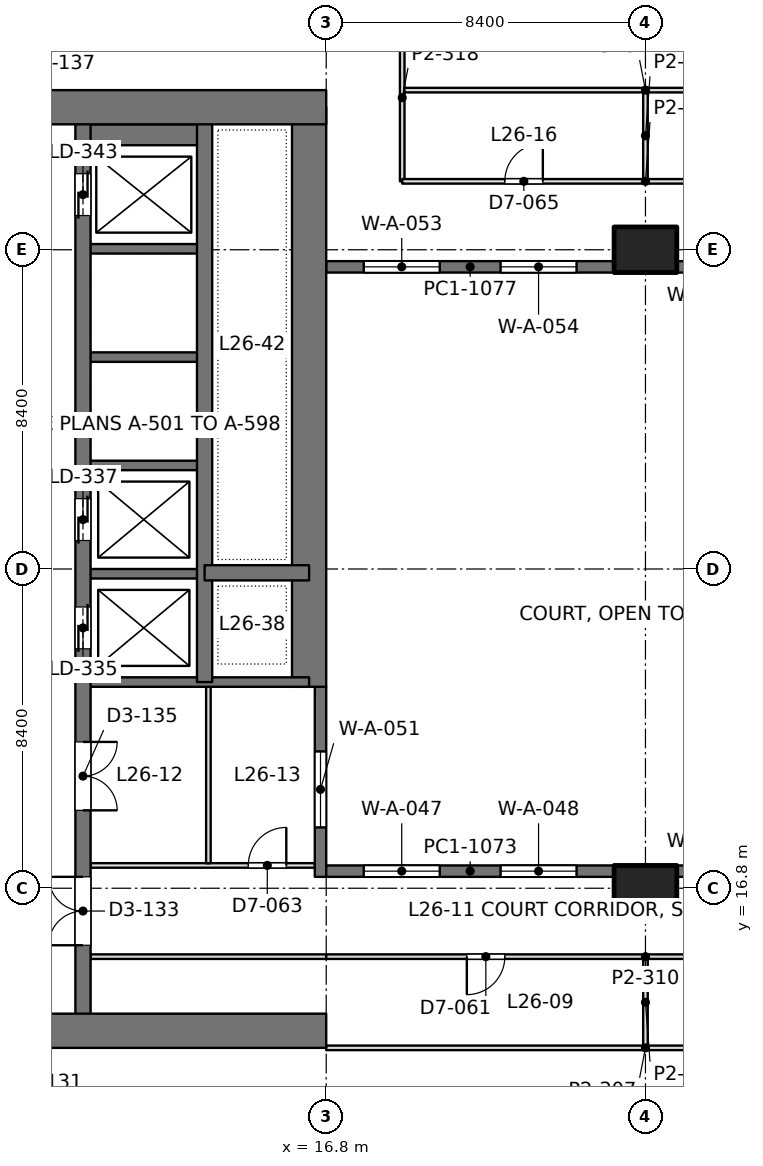
"""IFC4 building model, lengths in metres.
Left out: names, types, materials, properties, quantities, classifications, styles, units other than length and angle.
Written with IfcOpenShell. Run it as: python <this file> out.ifc"""

import sys

from ifc_helpers import new_model, si_unit, direction, frame, frame_2d, origin, origin_2d, place, context, subcontext, project, spatial, rectangle, extrude, element, fill, save


model = new_model("IFC4")
c1 = context("Model", 3, precision=1e-05, world=origin(), true_north=direction((0.0, 1.0)))
c2 = subcontext(c1, "Body", "Model", "MODEL_VIEW")
j1 = project(units=[si_unit("LENGTHUNIT", "METRE"), si_unit("PLANEANGLEUNIT", "RADIAN")], contexts=[c1])
p1 = place(None, origin())
s1 = spatial("IfcSite", under=j1, at=p1, CompositionType="ELEMENT")
p2 = place(p1, origin())
s2 = spatial("IfcBuilding", under=s1, at=p2, CompositionType="ELEMENT")
p3 = place(p2, frame((0.0, 0.0, 117.6)))
s3 = spatial("IfcBuildingStorey", under=s2, at=p3, CompositionType="ELEMENT", Elevation=117.6)
for number, where, z_axis, x_axis in (
    (1, (25.2, 16.8, 0.0), (0.0, 0.0, 1.0), (1.0, 0.0, 0.0)),
    (2, (25.2, 33.6, 0.0), (0.0, 0.0, 1.0), (1.0, 0.0, 0.0)),
):
    element("IfcColumn", number, at=place(p3, frame(where, z_axis=z_axis, x_axis=x_axis)), inside=s3, PredefinedType="COLUMN", context=c2, shape_type="SweptSolid", body=[
        extrude(rectangle(XDim=1.65, YDim=1.2, at=origin_2d()), origin(), (0.0, 0.0, 1.0), 4.2),
    ])
p4 = place(p3, frame((-1.2, 13.05, 0.0), z_axis=(0.0, 0.0, 1.0), x_axis=(1.0, 0.0, 0.0)))
e3 = element("IfcWall", 3, at=p4, inside=s3, PredefinedType="SHEAR", context=c2, shape_type="SweptSolid", body=[
    extrude(rectangle(XDim=18.0, YDim=0.9, at=frame_2d((9.0, 0.0))), origin(), (0.0, 0.0, 1.0), 4.2),
])
p5 = place(p4, frame((8.95, 0.0, 0.0)))
e4 = element("IfcOpeningElement", 4, at=p5, cuts=e3, PredefinedType="OPENING", context=c2, shape_type="SweptSolid", body=[
    extrude(rectangle(XDim=1.8, YDim=2.4, at=frame_2d((0.9, 1.2))), frame((0.0, 0.46, 0.0), z_axis=(0.0, -1.0, 0.0), x_axis=(1.0, 0.0, 0.0)), (0.0, 0.0, 1.0), 0.92),
])
p6 = place(p3, frame((-1.2, 37.35, 0.0), z_axis=(0.0, 0.0, 1.0), x_axis=(1.0, 0.0, 0.0)))
e5 = element("IfcWall", 5, at=p6, inside=s3, PredefinedType="SHEAR", context=c2, shape_type="SweptSolid", body=[
    extrude(rectangle(XDim=18.0, YDim=0.9, at=frame_2d((9.0, 0.0))), origin(), (0.0, 0.0, 1.0), 4.2),
])
p7 = place(p6, frame((8.95, 0.0, 0.0)))
e6 = element("IfcOpeningElement", 6, at=p7, cuts=e5, PredefinedType="OPENING", context=c2, shape_type="SweptSolid", body=[
    extrude(rectangle(XDim=1.8, YDim=2.4, at=frame_2d((0.9, 1.2))), frame((0.0, 0.46, 0.0), z_axis=(0.0, -1.0, 0.0), x_axis=(1.0, 0.0, 0.0)), (0.0, 0.0, 1.0), 0.92),
])
p8 = place(p3, frame((16.35, 22.1, 0.0), z_axis=(0.0, 0.0, 1.0), x_axis=(0.0, 1.0, 0.0)))
e7 = element("IfcWall", 7, at=p8, inside=s3, PredefinedType="SHEAR", context=c2, shape_type="SweptSolid", body=[
    extrude(rectangle(XDim=15.25, YDim=0.9, at=frame_2d((7.625, 0.0))), origin(), (0.0, 0.0, 1.0), 4.2),
])
p9 = place(p3, frame((10.4, 13.05, 0.0), z_axis=(0.0, 0.0, 1.0), x_axis=(0.0, 1.0, 0.0)))
e8 = element("IfcWall", 8, at=p9, inside=s3, PredefinedType="SHEAR", context=c2, shape_type="SweptSolid", body=[
    extrude(rectangle(XDim=24.3, YDim=0.4, at=frame_2d((12.15, 0.0))), origin(), (0.0, 0.0, 1.0), 4.2),
])
p10 = place(p9, frame((10.05, 0.0, 0.0)))
e9 = element("IfcOpeningElement", 9, at=p10, cuts=e8, PredefinedType="OPENING", context=c2, shape_type="SweptSolid", body=[
    extrude(rectangle(XDim=1.1, YDim=2.2, at=frame_2d((0.55, 1.1))), frame((0.0, 0.21, 0.0), z_axis=(0.0, -1.0, 0.0), x_axis=(1.0, 0.0, 0.0)), (0.0, 0.0, 1.0), 0.42),
])
p11 = place(p9, frame((12.9, 0.0, 0.0)))
e10 = element("IfcOpeningElement", 10, at=p11, cuts=e8, PredefinedType="OPENING", context=c2, shape_type="SweptSolid", body=[
    extrude(rectangle(XDim=1.1, YDim=2.2, at=frame_2d((0.55, 1.1))), frame((0.0, 0.21, 0.0), z_axis=(0.0, -1.0, 0.0), x_axis=(1.0, 0.0, 0.0)), (0.0, 0.0, 1.0), 0.42),
])
p12 = place(p9, frame((21.45, 0.0, 0.0)))
e11 = element("IfcOpeningElement", 11, at=p12, cuts=e8, PredefinedType="OPENING", context=c2, shape_type="SweptSolid", body=[
    extrude(rectangle(XDim=1.1, YDim=2.2, at=frame_2d((0.55, 1.1))), frame((0.0, 0.21, 0.0), z_axis=(0.0, -1.0, 0.0), x_axis=(1.0, 0.0, 0.0)), (0.0, 0.0, 1.0), 0.42),
])
p13 = place(p9, frame((2.25, 0.0, 0.0)))
e12 = element("IfcOpeningElement", 12, at=p13, cuts=e8, PredefinedType="OPENING", context=c2, shape_type="SweptSolid", body=[
    extrude(rectangle(XDim=1.8, YDim=2.4, at=frame_2d((0.9, 1.2))), frame((0.0, 0.21, 0.0), z_axis=(0.0, -1.0, 0.0), x_axis=(1.0, 0.0, 0.0)), (0.0, 0.0, 1.0), 0.42),
])
p14 = place(p9, frame((5.8, 0.0, 0.0)))
e13 = element("IfcOpeningElement", 13, at=p14, cuts=e8, PredefinedType="OPENING", context=c2, shape_type="SweptSolid", body=[
    extrude(rectangle(XDim=1.8, YDim=2.4, at=frame_2d((0.9, 1.2))), frame((0.0, 0.21, 0.0), z_axis=(0.0, -1.0, 0.0), x_axis=(1.0, 0.0, 0.0)), (0.0, 0.0, 1.0), 0.42),
])
p15 = place(p3, frame((13.6, 22.225, 0.0), z_axis=(0.0, 0.0, 1.0), x_axis=(0.0, 1.0, 0.0)))
e14 = element("IfcWall", 14, at=p15, inside=s3, PredefinedType="SHEAR", context=c2, shape_type="SweptSolid", body=[
    extrude(rectangle(XDim=15.125, YDim=0.4, at=frame_2d((7.562, 0.0))), origin(), (0.0, 0.0, 1.0), 4.2),
])
p16 = place(p3, frame((13.6, 25.1, 0.0), z_axis=(0.0, 0.0, 1.0), x_axis=(1.0, 0.0, 0.0)))
e15 = element("IfcWall", 15, at=p16, inside=s3, PredefinedType="SHEAR", context=c2, shape_type="SweptSolid", body=[
    extrude(rectangle(XDim=2.75, YDim=0.4, at=frame_2d((1.375, 0.0))), origin(), (0.0, 0.0, 1.0), 4.2),
])
p17 = place(p3, frame((10.4, 22.225, 0.0), z_axis=(0.0, 0.0, 1.0), x_axis=(1.0, 0.0, 0.0)))
e16 = element("IfcWall", 16, at=p17, inside=s3, PredefinedType="SHEAR", context=c2, shape_type="SweptSolid", body=[
    extrude(rectangle(XDim=5.95, YDim=0.25, at=frame_2d((2.975, 0.0))), origin(), (0.0, 0.0, 1.0), 4.2),
])
for number, where, z_axis, x_axis in (
    (17, (10.4, 25.075, 0.0), (0.0, 0.0, 1.0), (1.0, 0.0, 0.0)),
    (18, (10.4, 27.925, 0.0), (0.0, 0.0, 1.0), (1.0, 0.0, 0.0)),
    (19, (10.4, 30.775, 0.0), (0.0, 0.0, 1.0), (1.0, 0.0, 0.0)),
    (20, (10.4, 33.625, 0.0), (0.0, 0.0, 1.0), (1.0, 0.0, 0.0)),
):
    element("IfcWall", number, at=place(p3, frame(where, z_axis=z_axis, x_axis=x_axis)), inside=s3, PredefinedType="SHEAR", context=c2, shape_type="SweptSolid", body=[
        extrude(rectangle(XDim=3.2, YDim=0.25, at=frame_2d((1.6, 0.0))), origin(), (0.0, 0.0, 1.0), 4.2),
    ])
p18 = place(p3, frame((10.4, 36.625, 0.0), z_axis=(0.0, 0.0, 1.0), x_axis=(1.0, 0.0, 0.0)))
e21 = element("IfcWall", 21, at=p18, inside=s3, PredefinedType="SHEAR", context=c2, shape_type="SweptSolid", body=[
    extrude(rectangle(XDim=3.2, YDim=0.55, at=frame_2d((1.6, 0.0))), origin(), (0.0, 0.0, 1.0), 4.2),
])
p19 = place(p3, frame((16.65, 17.1, 0.0), z_axis=(0.0, 0.0, 1.0), x_axis=(0.0, 1.0, 0.0)))
e22 = element("IfcWall", 22, at=p19, inside=s3, PredefinedType="SOLIDWALL", context=c2, shape_type="SweptSolid", body=[
    extrude(rectangle(XDim=5.0, YDim=0.3, at=frame_2d((2.5, 0.0))), origin(), (0.0, 0.0, 1.0), 4.05),
])
p20 = place(p19, frame((1.3, 0.0, 0.1)))
e23 = element("IfcOpeningElement", 23, at=p20, cuts=e22, PredefinedType="OPENING", context=c2, shape_type="SweptSolid", body=[
    extrude(rectangle(XDim=2.0, YDim=3.0, at=frame_2d((1.0, 1.5))), frame((0.0, 0.16, 0.0), z_axis=(0.0, -1.0, 0.0), x_axis=(1.0, 0.0, 0.0)), (0.0, 0.0, 1.0), 0.32),
])
p21 = place(p3, frame((16.8, 17.25, 0.0), z_axis=(0.0, 0.0, 1.0), x_axis=(1.0, 0.0, 0.0)))
e24 = element("IfcWall", 24, at=p21, inside=s3, PredefinedType="SOLIDWALL", context=c2, shape_type="SweptSolid", body=[
    extrude(rectangle(XDim=7.575, YDim=0.3, at=frame_2d((3.788, 0.0))), origin(), (0.0, 0.0, 1.0), 4.05),
])
p22 = place(p21, frame((0.988, 0.0, 0.1)))
e25 = element("IfcOpeningElement", 25, at=p22, cuts=e24, PredefinedType="OPENING", context=c2, shape_type="SweptSolid", body=[
    extrude(rectangle(XDim=2.0, YDim=3.0, at=frame_2d((1.0, 1.5))), frame((0.0, 0.16, 0.0), z_axis=(0.0, -1.0, 0.0), x_axis=(1.0, 0.0, 0.0)), (0.0, 0.0, 1.0), 0.32),
])
p23 = place(p21, frame((4.587, 0.0, 0.1)))
e26 = element("IfcOpeningElement", 26, at=p23, cuts=e24, PredefinedType="OPENING", context=c2, shape_type="SweptSolid", body=[
    extrude(rectangle(XDim=2.0, YDim=3.0, at=frame_2d((1.0, 1.5))), frame((0.0, 0.16, 0.0), z_axis=(0.0, -1.0, 0.0), x_axis=(1.0, 0.0, 0.0)), (0.0, 0.0, 1.0), 0.32),
])
p24 = place(p3, frame((26.025, 17.25, 0.0), z_axis=(0.0, 0.0, 1.0), x_axis=(1.0, 0.0, 0.0)))
e27 = element("IfcWall", 27, at=p24, inside=s3, PredefinedType="SOLIDWALL", context=c2, shape_type="SweptSolid", body=[
    extrude(rectangle(XDim=7.575, YDim=0.3, at=frame_2d((3.788, 0.0))), origin(), (0.0, 0.0, 1.0), 4.05),
])
p25 = place(p24, frame((0.587, 0.0, 0.1)))
e28 = element("IfcOpeningElement", 28, at=p25, cuts=e27, PredefinedType="OPENING", context=c2, shape_type="SweptSolid", body=[
    extrude(rectangle(XDim=2.0, YDim=3.0, at=frame_2d((1.0, 1.5))), frame((0.0, 0.16, 0.0), z_axis=(0.0, -1.0, 0.0), x_axis=(1.0, 0.0, 0.0)), (0.0, 0.0, 1.0), 0.32),
])
p26 = place(p24, frame((4.188, 0.0, 0.1)))
e29 = element("IfcOpeningElement", 29, at=p26, cuts=e27, PredefinedType="OPENING", context=c2, shape_type="SweptSolid", body=[
    extrude(rectangle(XDim=2.0, YDim=3.0, at=frame_2d((1.0, 1.5))), frame((0.0, 0.16, 0.0), z_axis=(0.0, -1.0, 0.0), x_axis=(1.0, 0.0, 0.0)), (0.0, 0.0, 1.0), 0.32),
])
p27 = place(p3, frame((16.8, 33.15, 0.0), z_axis=(0.0, 0.0, 1.0), x_axis=(1.0, 0.0, 0.0)))
e30 = element("IfcWall", 30, at=p27, inside=s3, PredefinedType="SOLIDWALL", context=c2, shape_type="SweptSolid", body=[
    extrude(rectangle(XDim=7.575, YDim=0.3, at=frame_2d((3.788, 0.0))), origin(), (0.0, 0.0, 1.0), 4.05),
])
p28 = place(p27, frame((0.988, 0.0, 0.1)))
e31 = element("IfcOpeningElement", 31, at=p28, cuts=e30, PredefinedType="OPENING", context=c2, shape_type="SweptSolid", body=[
    extrude(rectangle(XDim=2.0, YDim=3.0, at=frame_2d((1.0, 1.5))), frame((0.0, 0.16, 0.0), z_axis=(0.0, -1.0, 0.0), x_axis=(1.0, 0.0, 0.0)), (0.0, 0.0, 1.0), 0.32),
])
p29 = place(p27, frame((4.587, 0.0, 0.1)))
e32 = element("IfcOpeningElement", 32, at=p29, cuts=e30, PredefinedType="OPENING", context=c2, shape_type="SweptSolid", body=[
    extrude(rectangle(XDim=2.0, YDim=3.0, at=frame_2d((1.0, 1.5))), frame((0.0, 0.16, 0.0), z_axis=(0.0, -1.0, 0.0), x_axis=(1.0, 0.0, 0.0)), (0.0, 0.0, 1.0), 0.32),
])
p30 = place(p3, frame((26.025, 33.15, 0.0), z_axis=(0.0, 0.0, 1.0), x_axis=(1.0, 0.0, 0.0)))
e33 = element("IfcWall", 33, at=p30, inside=s3, PredefinedType="SOLIDWALL", context=c2, shape_type="SweptSolid", body=[
    extrude(rectangle(XDim=7.575, YDim=0.3, at=frame_2d((3.788, 0.0))), origin(), (0.0, 0.0, 1.0), 4.05),
])
p31 = place(p30, frame((0.587, 0.0, 0.1)))
e34 = element("IfcOpeningElement", 34, at=p31, cuts=e33, PredefinedType="OPENING", context=c2, shape_type="SweptSolid", body=[
    extrude(rectangle(XDim=2.0, YDim=3.0, at=frame_2d((1.0, 1.5))), frame((0.0, 0.16, 0.0), z_axis=(0.0, -1.0, 0.0), x_axis=(1.0, 0.0, 0.0)), (0.0, 0.0, 1.0), 0.32),
])
p32 = place(p30, frame((4.188, 0.0, 0.1)))
e35 = element("IfcOpeningElement", 35, at=p32, cuts=e33, PredefinedType="OPENING", context=c2, shape_type="SweptSolid", body=[
    extrude(rectangle(XDim=2.0, YDim=3.0, at=frame_2d((1.0, 1.5))), frame((0.0, 0.16, 0.0), z_axis=(0.0, -1.0, 0.0), x_axis=(1.0, 0.0, 0.0)), (0.0, 0.0, 1.0), 0.32),
])
p33 = place(p3, frame((10.598, 17.4, 0.0), z_axis=(0.0, 0.0, 1.0), x_axis=(1.0, 0.0, 0.0)))
e36 = element("IfcWall", 36, at=p33, inside=s3, PredefinedType="PARTITIONING", context=c2, shape_type="SweptSolid", body=[
    extrude(rectangle(XDim=5.904, YDim=0.12, at=frame_2d((2.952, 0.0))), origin(), (0.0, 0.0, 1.0), 3.55),
])
p34 = place(p33, frame((4.152, 0.0, 0.0)))
e37 = element("IfcOpeningElement", 37, at=p34, cuts=e36, PredefinedType="OPENING", context=c2, shape_type="SweptSolid", body=[
    extrude(rectangle(XDim=1.0, YDim=2.4, at=frame_2d((0.5, 1.2))), frame((0.0, 0.07, 0.0), z_axis=(0.0, -1.0, 0.0), x_axis=(1.0, 0.0, 0.0)), (0.0, 0.0, 1.0), 0.14),
])
p35 = place(p3, frame((13.7, 17.458, 0.0), z_axis=(0.0, 0.0, 1.0), x_axis=(0.0, 1.0, 0.0)))
e38 = element("IfcWall", 38, at=p35, inside=s3, PredefinedType="PARTITIONING", context=c2, shape_type="SweptSolid", body=[
    extrude(rectangle(XDim=4.644, YDim=0.12, at=frame_2d((2.322, 0.0))), origin(), (0.0, 0.0, 1.0), 3.6),
])
p36 = place(p3, frame((10.598, 15.0, 0.0), z_axis=(0.0, 0.0, 1.0), x_axis=(1.0, 0.0, 0.0)))
e39 = element("IfcWall", 39, at=p36, inside=s3, PredefinedType="PARTITIONING", context=c2, shape_type="SweptSolid", body=[
    extrude(rectangle(XDim=6.204, YDim=0.12, at=frame_2d((3.102, 0.0))), origin(), (0.0, 0.0, 1.0), 3.55),
])
p37 = place(p3, frame((25.2, 12.658, 0.0), z_axis=(0.0, 0.0, 1.0), x_axis=(0.0, 1.0, 0.0)))
e40 = element("IfcWall", 40, at=p37, inside=s3, PredefinedType="PARTITIONING", context=c2, shape_type="SweptSolid", body=[
    extrude(rectangle(XDim=2.284, YDim=0.12, at=frame_2d((1.142, 0.0))), origin(), (0.0, 0.0, 1.0), 3.55),
])
p38 = place(p3, frame((16.798, 15.0, 0.0), z_axis=(0.0, 0.0, 1.0), x_axis=(1.0, 0.0, 0.0)))
e41 = element("IfcWall", 41, at=p38, inside=s3, PredefinedType="PARTITIONING", context=c2, shape_type="SweptSolid", body=[
    extrude(rectangle(XDim=16.804, YDim=0.12, at=frame_2d((8.402, 0.0))), origin(), (0.0, 0.0, 1.0), 3.55),
])
p39 = place(p38, frame((3.702, 0.0, 0.0)))
e42 = element("IfcOpeningElement", 42, at=p39, cuts=e41, PredefinedType="OPENING", context=c2, shape_type="SweptSolid", body=[
    extrude(rectangle(XDim=1.0, YDim=2.4, at=frame_2d((0.5, 1.2))), frame((0.0, 0.07, 0.0), z_axis=(0.0, -1.0, 0.0), x_axis=(1.0, 0.0, 0.0)), (0.0, 0.0, 1.0), 0.14),
])
p40 = place(p38, frame((12.102, 0.0, 0.0)))
e43 = element("IfcOpeningElement", 43, at=p40, cuts=e41, PredefinedType="OPENING", context=c2, shape_type="SweptSolid", body=[
    extrude(rectangle(XDim=1.0, YDim=2.4, at=frame_2d((0.5, 1.2))), frame((0.0, 0.07, 0.0), z_axis=(0.0, -1.0, 0.0), x_axis=(1.0, 0.0, 0.0)), (0.0, 0.0, 1.0), 0.14),
])
p41 = place(p3, frame((16.8, 12.6, 0.0), z_axis=(0.0, 0.0, 1.0), x_axis=(1.0, 0.0, 0.0)))
e44 = element("IfcWall", 44, at=p41, inside=s3, PredefinedType="PARTITIONING", context=c2, shape_type="SweptSolid", body=[
    extrude(rectangle(XDim=16.8, YDim=0.12, at=frame_2d((8.4, 0.0))), origin(), (0.0, 0.0, 1.0), 3.55),
])
p42 = place(p3, frame((18.8, 35.4, 0.0), z_axis=(0.0, 0.0, 1.0), x_axis=(0.0, 1.0, 0.0)))
e45 = element("IfcWall", 45, at=p42, inside=s3, PredefinedType="PARTITIONING", context=c2, shape_type="SweptSolid", body=[
    extrude(rectangle(XDim=4.4, YDim=0.12, at=frame_2d((2.2, 0.0))), origin(), (0.0, 0.0, 1.0), 4.05),
])
p43 = place(p3, frame((25.2, 35.458, 0.0), z_axis=(0.0, 0.0, 1.0), x_axis=(0.0, 1.0, 0.0)))
e46 = element("IfcWall", 46, at=p43, inside=s3, PredefinedType="PARTITIONING", context=c2, shape_type="SweptSolid", body=[
    extrude(rectangle(XDim=2.284, YDim=0.12, at=frame_2d((1.142, 0.0))), origin(), (0.0, 0.0, 1.0), 3.55),
])
p44 = place(p3, frame((18.8, 35.4, 0.0), z_axis=(0.0, 0.0, 1.0), x_axis=(1.0, 0.0, 0.0)))
e47 = element("IfcWall", 47, at=p44, inside=s3, PredefinedType="PARTITIONING", context=c2, shape_type="SweptSolid", body=[
    extrude(rectangle(XDim=12.8, YDim=0.12, at=frame_2d((6.4, 0.0))), origin(), (0.0, 0.0, 1.0), 3.55),
])
p45 = place(p44, frame((2.7, 0.0, 0.0)))
e48 = element("IfcOpeningElement", 48, at=p45, cuts=e47, PredefinedType="OPENING", context=c2, shape_type="SweptSolid", body=[
    extrude(rectangle(XDim=1.0, YDim=2.4, at=frame_2d((0.5, 1.2))), frame((0.0, 0.07, 0.0), z_axis=(0.0, -1.0, 0.0), x_axis=(1.0, 0.0, 0.0)), (0.0, 0.0, 1.0), 0.14),
])
p46 = place(p44, frame((9.1, 0.0, 0.0)))
e49 = element("IfcOpeningElement", 49, at=p46, cuts=e47, PredefinedType="OPENING", context=c2, shape_type="SweptSolid", body=[
    extrude(rectangle(XDim=1.0, YDim=2.4, at=frame_2d((0.5, 1.2))), frame((0.0, 0.07, 0.0), z_axis=(0.0, -1.0, 0.0), x_axis=(1.0, 0.0, 0.0)), (0.0, 0.0, 1.0), 0.14),
])
p47 = place(p3, frame((18.858, 37.8, 0.0), z_axis=(0.0, 0.0, 1.0), x_axis=(1.0, 0.0, 0.0)))
e50 = element("IfcWall", 50, at=p47, inside=s3, PredefinedType="PARTITIONING", context=c2, shape_type="SweptSolid", body=[
    extrude(rectangle(XDim=12.684, YDim=0.12, at=frame_2d((6.342, 0.0))), origin(), (0.0, 0.0, 1.0), 3.55),
])
p48 = place(p20, origin())
e51 = element("IfcWindow", 51, at=p48, inside=s3, PartitioningType="SINGLE_PANEL", PredefinedType="WINDOW", context=c2, shape_type="SweptSolid", body=[
    extrude(rectangle(XDim=2.0, YDim=3.0, at=frame_2d((1.0, 1.5))), frame((0.0, 0.03, 0.0), z_axis=(0.0, -1.0, 0.0), x_axis=(1.0, 0.0, 0.0)), (0.0, 0.0, 1.0), 0.06),
])
fill(e23, e51)
p49 = place(p22, origin())
e52 = element("IfcWindow", 52, at=p49, inside=s3, PartitioningType="SINGLE_PANEL", PredefinedType="WINDOW", context=c2, shape_type="SweptSolid", body=[
    extrude(rectangle(XDim=2.0, YDim=3.0, at=frame_2d((1.0, 1.5))), frame((0.0, 0.03, 0.0), z_axis=(0.0, -1.0, 0.0), x_axis=(1.0, 0.0, 0.0)), (0.0, 0.0, 1.0), 0.06),
])
fill(e25, e52)
p50 = place(p23, origin())
e53 = element("IfcWindow", 53, at=p50, inside=s3, PartitioningType="SINGLE_PANEL", PredefinedType="WINDOW", context=c2, shape_type="SweptSolid", body=[
    extrude(rectangle(XDim=2.0, YDim=3.0, at=frame_2d((1.0, 1.5))), frame((0.0, 0.03, 0.0), z_axis=(0.0, -1.0, 0.0), x_axis=(1.0, 0.0, 0.0)), (0.0, 0.0, 1.0), 0.06),
])
fill(e26, e53)
p51 = place(p28, origin())
e54 = element("IfcWindow", 54, at=p51, inside=s3, PartitioningType="SINGLE_PANEL", PredefinedType="WINDOW", context=c2, shape_type="SweptSolid", body=[
    extrude(rectangle(XDim=2.0, YDim=3.0, at=frame_2d((1.0, 1.5))), frame((0.0, 0.03, 0.0), z_axis=(0.0, -1.0, 0.0), x_axis=(1.0, 0.0, 0.0)), (0.0, 0.0, 1.0), 0.06),
])
fill(e31, e54)
p52 = place(p29, origin())
e55 = element("IfcWindow", 55, at=p52, inside=s3, PartitioningType="SINGLE_PANEL", PredefinedType="WINDOW", context=c2, shape_type="SweptSolid", body=[
    extrude(rectangle(XDim=2.0, YDim=3.0, at=frame_2d((1.0, 1.5))), frame((0.0, 0.03, 0.0), z_axis=(0.0, -1.0, 0.0), x_axis=(1.0, 0.0, 0.0)), (0.0, 0.0, 1.0), 0.06),
])
fill(e32, e55)
p53 = place(p10, origin())
e56 = element("IfcDoor", 56, at=p53, inside=s3, OperationType="DOUBLE_DOOR_SLIDING", PredefinedType="DOOR", context=c2, shape_type="SweptSolid", body=[
    extrude(rectangle(XDim=1.1, YDim=2.2, at=frame_2d((0.55, 1.1))), frame((0.0, 0.025, 0.0), z_axis=(0.0, -1.0, 0.0), x_axis=(1.0, 0.0, 0.0)), (0.0, 0.0, 1.0), 0.05),
])
fill(e9, e56)
p54 = place(p11, origin())
e57 = element("IfcDoor", 57, at=p54, inside=s3, OperationType="DOUBLE_DOOR_SLIDING", PredefinedType="DOOR", context=c2, shape_type="SweptSolid", body=[
    extrude(rectangle(XDim=1.1, YDim=2.2, at=frame_2d((0.55, 1.1))), frame((0.0, 0.025, 0.0), z_axis=(0.0, -1.0, 0.0), x_axis=(1.0, 0.0, 0.0)), (0.0, 0.0, 1.0), 0.05),
])
fill(e10, e57)
p55 = place(p12, origin())
e58 = element("IfcDoor", 58, at=p55, inside=s3, OperationType="DOUBLE_DOOR_SLIDING", PredefinedType="DOOR", context=c2, shape_type="SweptSolid", body=[
    extrude(rectangle(XDim=1.1, YDim=2.2, at=frame_2d((0.55, 1.1))), frame((0.0, 0.025, 0.0), z_axis=(0.0, -1.0, 0.0), x_axis=(1.0, 0.0, 0.0)), (0.0, 0.0, 1.0), 0.05),
])
fill(e11, e58)
p56 = place(p13, origin())
e59 = element("IfcDoor", 59, at=p56, inside=s3, OperationType="DOUBLE_DOOR_SINGLE_SWING", PredefinedType="DOOR", context=c2, shape_type="SweptSolid", body=[
    extrude(rectangle(XDim=1.8, YDim=2.4, at=frame_2d((0.9, 1.2))), frame((0.0, 0.025, 0.0), z_axis=(0.0, -1.0, 0.0), x_axis=(1.0, 0.0, 0.0)), (0.0, 0.0, 1.0), 0.05),
])
fill(e12, e59)
p57 = place(p14, frame((1.8, 0.0, 0.0), z_axis=(0.0, 0.0, 1.0), x_axis=(-1.0, 0.0, 0.0)))
e60 = element("IfcDoor", 60, at=p57, inside=s3, OperationType="DOUBLE_DOOR_SINGLE_SWING", PredefinedType="DOOR", context=c2, shape_type="SweptSolid", body=[
    extrude(rectangle(XDim=1.8, YDim=2.4, at=frame_2d((0.9, 1.2))), frame((0.0, 0.025, 0.0), z_axis=(0.0, -1.0, 0.0), x_axis=(1.0, 0.0, 0.0)), (0.0, 0.0, 1.0), 0.05),
])
fill(e13, e60)
p58 = place(p34, origin())
e61 = element("IfcDoor", 61, at=p58, inside=s3, OperationType="SINGLE_SWING_RIGHT", PredefinedType="DOOR", context=c2, shape_type="SweptSolid", body=[
    extrude(rectangle(XDim=1.0, YDim=2.4, at=frame_2d((0.5, 1.2))), frame((0.0, 0.025, 0.0), z_axis=(0.0, -1.0, 0.0), x_axis=(1.0, 0.0, 0.0)), (0.0, 0.0, 1.0), 0.05),
])
fill(e37, e61)
p59 = place(p39, frame((1.0, 0.0, 0.0), z_axis=(0.0, 0.0, 1.0), x_axis=(-1.0, 0.0, 0.0)))
e62 = element("IfcDoor", 62, at=p59, inside=s3, OperationType="SINGLE_SWING_RIGHT", PredefinedType="DOOR", context=c2, shape_type="SweptSolid", body=[
    extrude(rectangle(XDim=1.0, YDim=2.4, at=frame_2d((0.5, 1.2))), frame((0.0, 0.025, 0.0), z_axis=(0.0, -1.0, 0.0), x_axis=(1.0, 0.0, 0.0)), (0.0, 0.0, 1.0), 0.05),
])
fill(e42, e62)
p60 = place(p45, origin())
e63 = element("IfcDoor", 63, at=p60, inside=s3, OperationType="SINGLE_SWING_RIGHT", PredefinedType="DOOR", context=c2, shape_type="SweptSolid", body=[
    extrude(rectangle(XDim=1.0, YDim=2.4, at=frame_2d((0.5, 1.2))), frame((0.0, 0.025, 0.0), z_axis=(0.0, -1.0, 0.0), x_axis=(1.0, 0.0, 0.0)), (0.0, 0.0, 1.0), 0.05),
])
fill(e48, e63)
save(model, sys.argv[1])
